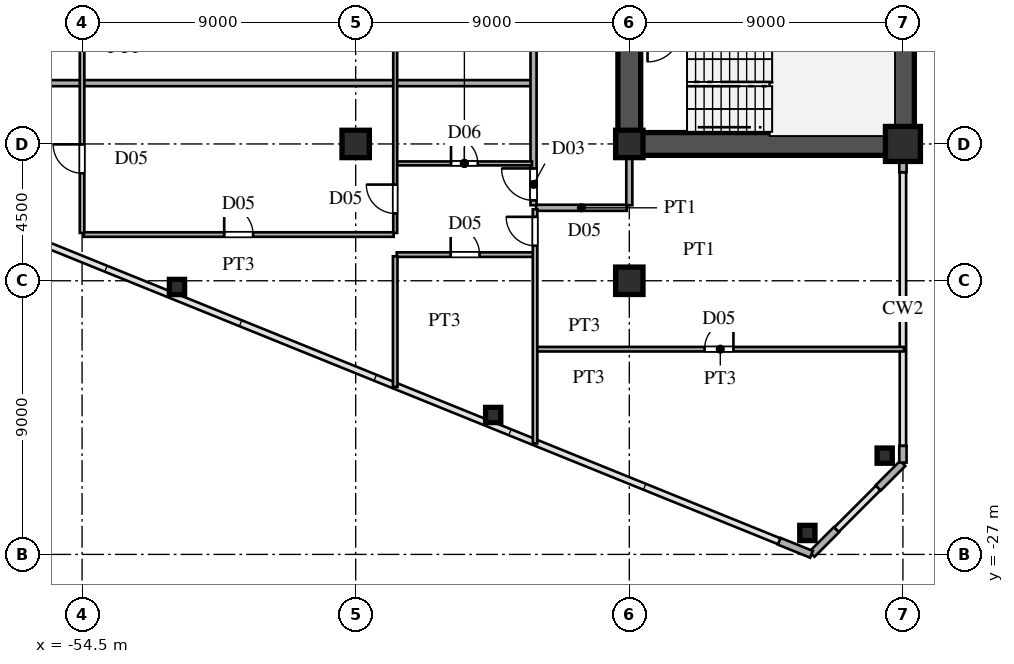
"""IFC4 building model, lengths in metres.
Left out: names, types, materials, properties, quantities, classifications, styles, units other than length and angle.
Written with IfcOpenShell. Run it as: python <this file> out.ifc"""

import sys

from ifc_helpers import new_model, si_unit, direction, frame, frame_2d, origin, origin_2d, place, context, subcontext, project, spatial, rectangle, hollow_rectangle, i_section, extrude, source, transform, mapped, element, fill, save


model = new_model("IFC4")
c1 = context("Model", 3, precision=1e-05, world=origin(), true_north=direction((0.0, 1.0)))
c2 = subcontext(c1, "Body", "Model", "MODEL_VIEW")
j1 = project(units=[si_unit("LENGTHUNIT", "METRE"), si_unit("PLANEANGLEUNIT", "RADIAN")], contexts=[c1])
p1 = place(None, origin())
s1 = spatial("IfcSite", under=j1, at=p1, CompositionType="ELEMENT")
p2 = place(p1, origin())
s2 = spatial("IfcBuilding", under=s1, at=p2, CompositionType="ELEMENT")
p3 = place(p2, frame((0.0, 0.0, 26.1)))
s3 = spatial("IfcBuildingStorey", under=s2, at=p3, CompositionType="ELEMENT", Elevation=26.1)
m1 = source(origin(), c2, "Body", "SweptSolid", [
    extrude(hollow_rectangle(XDim=1.15, YDim=1.15, WallThickness=0.048, at=origin_2d()), origin(), (0.0, 0.0, 1.0), 3.6),
])
p4 = place(p3, frame((-27.5, -13.5, 0.0), z_axis=(0.0, 0.0, 1.0), x_axis=(1.0, 0.0, 0.0)))
e1 = element("IfcColumn", 1, at=p4, inside=s3, PredefinedType="COLUMN", context=c2, shape_type="MappedRepresentation", body=[
    mapped(m1, transform((0.0, 0.0, 0.0), scale=1.0)),
])
m2 = source(origin(), c2, "Body", "SweptSolid", [
    extrude(i_section(OverallWidth=0.9, OverallDepth=0.9, WebThickness=0.036, FlangeThickness=0.055, at=origin_2d()), origin(), (0.0, 0.0, 1.0), 3.6),
])
for number, where, z_axis, x_axis in (
    (2, (-36.5, -18.0, 0.0), (0.0, 0.0, 1.0), (1.0, 0.0, 0.0)),
    (3, (-36.5, -13.5, 0.0), (0.0, 0.0, 1.0), (1.0, 0.0, 0.0)),
    (4, (-45.5, -13.5, 0.0), (0.0, 0.0, 1.0), (1.0, 0.0, 0.0)),
):
    element("IfcColumn", number, at=place(p3, frame(where, z_axis=z_axis, x_axis=x_axis)), inside=s3, PredefinedType="COLUMN", context=c2, shape_type="MappedRepresentation", body=[
        mapped(m2, transform((0.0, 0.0, 0.0), scale=1.0)),
    ])
m3 = source(origin(), c2, "Body", "SweptSolid", [
    extrude(hollow_rectangle(XDim=0.5, YDim=0.5, WallThickness=0.02, at=origin_2d()), origin(), (0.0, 0.0, 1.0), 3.6),
])
for number, where, z_axis, x_axis in (
    (5, (-28.1, -23.751, 0.0), (0.0, 0.0, 1.0), (1.0, 0.0, 0.0)),
    (6, (-30.643, -26.295, 0.0), (0.0, 0.0, 1.0), (1.0, 0.0, 0.0)),
    (7, (-40.977, -22.414, 0.0), (0.0, 0.0, 1.0), (1.0, 0.0, 0.0)),
    (8, (-51.378, -18.204, 0.0), (0.0, 0.0, 1.0), (1.0, 0.0, 0.0)),
):
    element("IfcColumn", number, at=place(p3, frame(where, z_axis=z_axis, x_axis=x_axis)), inside=s3, PredefinedType="COLUMN", context=c2, shape_type="MappedRepresentation", body=[
        mapped(m3, transform((0.0, 0.0, 0.0), scale=1.0)),
    ])
p5 = place(p3, frame((-27.5, -23.98, 0.0), z_axis=(0.0, 0.0, 1.0), x_axis=(0.0, 1.0, 0.0)))
e9 = element("IfcWall", 9, at=p5, inside=s3, PredefinedType="SOLIDWALL", context=c2, shape_type="SweptSolid", body=[
    extrude(rectangle(XDim=0.55, YDim=0.24, at=frame_2d((0.275, 0.0))), origin(), (0.0, 0.0, 1.0), 3.38),
])
p6 = place(p3, frame((-27.5, -14.43, 0.0), z_axis=(0.0, 0.0, 1.0), x_axis=(0.0, 1.0, 0.0)))
e10 = element("IfcWall", 10, at=p6, inside=s3, PredefinedType="SOLIDWALL", context=c2, shape_type="SweptSolid", body=[
    extrude(rectangle(XDim=0.55, YDim=0.24, at=frame_2d((0.275, 0.0))), origin(), (0.0, 0.0, 1.0), 2.88),
])
p7 = place(p3, frame((-31.566, -26.569, 0.0), z_axis=(0.0, 0.0, 1.0), x_axis=(0.927007103665, -0.375043770452, 0.0)))
e11 = element("IfcWall", 11, at=p7, inside=s3, PredefinedType="SOLIDWALL", context=c2, shape_type="SweptSolid", body=[
    extrude(rectangle(XDim=1.14, YDim=0.24, at=frame_2d((0.57, 0.0))), origin(), (0.0, 0.0, 1.0), 3.38),
])
for number, where, z_axis, x_axis in (
    (12, (-30.493, -26.993, 0.0), (0.0, 0.0, 1.0), (0.707, 0.707, 0.0)),
    (13, (-28.313, -24.813, 0.0), (0.0, 0.0, 1.0), (0.707, 0.707, 0.0)),
):
    element("IfcWall", number, at=place(p3, frame(where, z_axis=z_axis, x_axis=x_axis)), inside=s3, PredefinedType="SOLIDWALL", context=c2, shape_type="SweptSolid", body=[
        extrude(rectangle(XDim=1.14, YDim=0.24, at=frame_2d((0.57, 0.0))), origin(), (0.0, 0.0, 1.0), 3.38),
    ])
p8 = place(p3, frame((-27.5, -13.5, 0.0), z_axis=(0.0, 0.0, 1.0), x_axis=(0.0, 1.0, 0.0)))
e14 = element("IfcWall", 14, at=p8, inside=s3, PredefinedType="SHEAR", context=c2, shape_type="SweptSolid", body=[
    extrude(rectangle(XDim=12.2, YDim=0.75, at=frame_2d((6.1, 0.0))), origin(), (0.0, 0.0, 1.0), 3.38),
])
p9 = place(p3, frame((-36.5, -13.5, 0.0), z_axis=(0.0, 0.0, 1.0), x_axis=(1.0, 0.0, 0.0)))
e15 = element("IfcWall", 15, at=p9, inside=s3, PredefinedType="SHEAR", context=c2, shape_type="SweptSolid", body=[
    extrude(rectangle(XDim=9.0, YDim=0.75, at=frame_2d((4.5, 0.0))), origin(), (0.0, 0.0, 1.0), 3.38),
])
p10 = place(p3, frame((-36.5, -13.65, 0.0), z_axis=(0.0, 0.0, 1.0), x_axis=(0.0, 1.0, 0.0)))
e16 = element("IfcWall", 16, at=p10, inside=s3, PredefinedType="SHEAR", context=c2, shape_type="SweptSolid", body=[
    extrude(rectangle(XDim=7.15, YDim=0.75, at=frame_2d((3.575, 0.0))), origin(), (0.0, 0.0, 1.0), 3.38),
])
p11 = place(p10, frame((4.675, 0.0, 0.0)))
e17 = element("IfcOpeningElement", 17, at=p11, cuts=e16, PredefinedType="OPENING", context=c2, shape_type="SweptSolid", body=[
    extrude(rectangle(XDim=1.15, YDim=2.2, at=frame_2d((0.575, 1.1))), frame((0.0, 0.385, 0.0), z_axis=(0.0, -1.0, 0.0), x_axis=(1.0, 0.0, 0.0)), (0.0, 0.0, 1.0), 0.77),
])
p12 = place(p3, frame((-39.55, -20.25, 0.0), z_axis=(0.0, 0.0, 1.0), x_axis=(1.0, 0.0, 0.0)))
e18 = element("IfcWall", 18, at=p12, inside=s3, PredefinedType="PARTITIONING", context=c2, shape_type="SweptSolid", body=[
    extrude(rectangle(XDim=12.085, YDim=0.15, at=frame_2d((6.042, 0.0))), origin(), (0.0, 0.0, 1.0), 3.38),
])
p13 = place(p12, frame((5.525, 0.0, 0.0)))
e19 = element("IfcOpeningElement", 19, at=p13, cuts=e18, PredefinedType="OPENING", context=c2, shape_type="SweptSolid", body=[
    extrude(rectangle(XDim=0.95, YDim=2.15, at=frame_2d((0.475, 1.075))), frame((0.0, 0.085, 0.0), z_axis=(0.0, -1.0, 0.0), x_axis=(1.0, 0.0, 0.0)), (0.0, 0.0, 1.0), 0.17),
])
p14 = place(p3, frame((-44.15, -17.14, 0.0), z_axis=(0.0, 0.0, 1.0), x_axis=(1.0, 0.0, 0.0)))
e20 = element("IfcWall", 20, at=p14, inside=s3, PredefinedType="PARTITIONING", context=c2, shape_type="SweptSolid", body=[
    extrude(rectangle(XDim=4.5, YDim=0.15, at=frame_2d((2.25, 0.0))), origin(), (0.0, 0.0, 1.0), 3.38),
])
p15 = place(p14, frame((1.775, 0.0, 0.0)))
e21 = element("IfcOpeningElement", 21, at=p15, cuts=e20, PredefinedType="OPENING", context=c2, shape_type="SweptSolid", body=[
    extrude(rectangle(XDim=0.95, YDim=2.15, at=frame_2d((0.475, 1.075))), frame((0.0, 0.085, 0.0), z_axis=(0.0, -1.0, 0.0), x_axis=(1.0, 0.0, 0.0)), (0.0, 0.0, 1.0), 0.17),
])
p16 = place(p3, frame((-54.45, -16.48, 0.0), z_axis=(0.0, 0.0, 1.0), x_axis=(1.0, 0.0, 0.0)))
e22 = element("IfcWall", 22, at=p16, inside=s3, PredefinedType="PARTITIONING", context=c2, shape_type="SweptSolid", body=[
    extrude(rectangle(XDim=10.2, YDim=0.15, at=frame_2d((5.1, 0.0))), origin(), (0.0, 0.0, 1.0), 3.38),
])
p17 = place(p16, frame((4.625, 0.0, 0.0)))
e23 = element("IfcOpeningElement", 23, at=p17, cuts=e22, PredefinedType="OPENING", context=c2, shape_type="SweptSolid", body=[
    extrude(rectangle(XDim=0.95, YDim=2.15, at=frame_2d((0.475, 1.075))), frame((0.0, 0.085, 0.0), z_axis=(0.0, -1.0, 0.0), x_axis=(1.0, 0.0, 0.0)), (0.0, 0.0, 1.0), 0.17),
])
p18 = place(p3, frame((-39.565, -15.6, 0.0), z_axis=(0.0, 0.0, 1.0), x_axis=(1.0, 0.0, 0.0)))
e24 = element("IfcWall", 24, at=p18, inside=s3, PredefinedType="PARTITIONING", context=c2, shape_type="SweptSolid", body=[
    extrude(rectangle(XDim=2.98, YDim=0.2, at=frame_2d((1.49, 0.0))), origin(), (0.0, 0.0, 1.0), 3.38),
])
p19 = place(p3, frame((-44.15, -14.14, 0.0), z_axis=(0.0, 0.0, 1.0), x_axis=(1.0, 0.0, 0.0)))
e25 = element("IfcWall", 25, at=p19, inside=s3, PredefinedType="PARTITIONING", context=c2, shape_type="SweptSolid", body=[
    extrude(rectangle(XDim=4.45, YDim=0.13, at=frame_2d((2.225, 0.0))), origin(), (0.0, 0.0, 1.0), 3.38),
])
p20 = place(p19, frame((1.785, 0.0, 0.0)))
e26 = element("IfcOpeningElement", 26, at=p20, cuts=e25, PredefinedType="OPENING", context=c2, shape_type="SweptSolid", body=[
    extrude(rectangle(XDim=0.88, YDim=2.1, at=frame_2d((0.44, 1.05))), frame((0.0, 0.075, 0.0), z_axis=(0.0, -1.0, 0.0), x_axis=(1.0, 0.0, 0.0)), (0.0, 0.0, 1.0), 0.15),
])
p21 = place(p3, frame((-68.807, -11.5, 0.0), z_axis=(0.0, 0.0, 1.0), x_axis=(1.0, 0.0, 0.0)))
e27 = element("IfcWall", 27, at=p21, inside=s3, PredefinedType="PARTITIONING", context=c2, shape_type="SweptSolid", body=[
    extrude(rectangle(XDim=29.077, YDim=0.2, at=frame_2d((14.539, 0.0))), origin(), (0.0, 0.0, 1.0), 3.38),
])
p22 = place(p3, frame((-54.5, -16.427, 0.0), z_axis=(0.0, 0.0, 1.0), x_axis=(0.0, 1.0, 0.0)))
e28 = element("IfcWall", 28, at=p22, inside=s3, PredefinedType="PARTITIONING", context=c2, shape_type="SweptSolid", body=[
    extrude(rectangle(XDim=32.854, YDim=0.15, at=frame_2d((16.427, 0.0))), origin(), (0.0, 0.0, 1.0), 2.68),
])
p23 = place(p22, frame((1.963, 0.0, 0.0)))
e29 = element("IfcOpeningElement", 29, at=p23, cuts=e28, PredefinedType="OPENING", context=c2, shape_type="SweptSolid", body=[
    extrude(rectangle(XDim=0.95, YDim=2.15, at=frame_2d((0.475, 1.075))), frame((0.0, 0.085, 0.0), z_axis=(0.0, -1.0, 0.0), x_axis=(1.0, 0.0, 0.0)), (0.0, 0.0, 1.0), 0.17),
])
p24 = place(p22, frame((10.47, 0.0, 0.0)))
e30 = element("IfcOpeningElement", 30, at=p24, cuts=e28, PredefinedType="OPENING", context=c2, shape_type="SweptSolid", body=[
    extrude(rectangle(XDim=0.95, YDim=2.15, at=frame_2d((0.475, 1.075))), frame((0.0, 0.085, 0.0), z_axis=(0.0, -1.0, 0.0), x_axis=(1.0, 0.0, 0.0)), (0.0, 0.0, 1.0), 0.17),
])
p25 = place(p22, frame((19.504, 0.0, 0.0)))
e31 = element("IfcOpeningElement", 31, at=p25, cuts=e28, PredefinedType="OPENING", context=c2, shape_type="SweptSolid", body=[
    extrude(rectangle(XDim=0.95, YDim=2.15, at=frame_2d((0.475, 1.075))), frame((0.0, 0.085, 0.0), z_axis=(0.0, -1.0, 0.0), x_axis=(1.0, 0.0, 0.0)), (0.0, 0.0, 1.0), 0.17),
])
p26 = place(p22, frame((29.941, 0.0, 0.0)))
e32 = element("IfcOpeningElement", 32, at=p26, cuts=e28, PredefinedType="OPENING", context=c2, shape_type="SweptSolid", body=[
    extrude(rectangle(XDim=0.95, YDim=2.15, at=frame_2d((0.475, 1.075))), frame((0.0, 0.085, 0.0), z_axis=(0.0, -1.0, 0.0), x_axis=(1.0, 0.0, 0.0)), (0.0, 0.0, 1.0), 0.17),
])
p27 = place(p3, frame((-44.2, -21.49, 0.0), z_axis=(0.0, 0.0, 1.0), x_axis=(0.0, 1.0, 0.0)))
e33 = element("IfcWall", 33, at=p27, inside=s3, PredefinedType="PARTITIONING", context=c2, shape_type="SweptSolid", body=[
    extrude(rectangle(XDim=4.295, YDim=0.15, at=frame_2d((2.147, 0.0))), origin(), (0.0, 0.0, 1.0), 3.38),
])
p28 = place(p3, frame((-44.2, -16.427, 0.0), z_axis=(0.0, 0.0, 1.0), x_axis=(0.0, 1.0, 0.0)))
e34 = element("IfcWall", 34, at=p28, inside=s3, PredefinedType="PARTITIONING", context=c2, shape_type="SweptSolid", body=[
    extrude(rectangle(XDim=13.877, YDim=0.13, at=frame_2d((6.938, 0.0))), origin(), (0.0, 0.0, 1.0), 3.38),
])
p29 = place(p28, frame((0.641, 0.0, 0.0)))
e35 = element("IfcOpeningElement", 35, at=p29, cuts=e34, PredefinedType="OPENING", context=c2, shape_type="SweptSolid", body=[
    extrude(rectangle(XDim=0.95, YDim=2.15, at=frame_2d((0.475, 1.075))), frame((0.0, 0.075, 0.0), z_axis=(0.0, -1.0, 0.0), x_axis=(1.0, 0.0, 0.0)), (0.0, 0.0, 1.0), 0.15),
])
p30 = place(p28, frame((10.454, 0.0, 0.0)))
e36 = element("IfcOpeningElement", 36, at=p30, cuts=e34, PredefinedType="OPENING", context=c2, shape_type="SweptSolid", body=[
    extrude(rectangle(XDim=0.95, YDim=2.15, at=frame_2d((0.475, 1.075))), frame((0.0, 0.075, 0.0), z_axis=(0.0, -1.0, 0.0), x_axis=(1.0, 0.0, 0.0)), (0.0, 0.0, 1.0), 0.15),
])
p31 = place(p3, frame((-39.65, -15.515, 0.0), z_axis=(0.0, 0.0, 1.0), x_axis=(0.0, 1.0, 0.0)))
e37 = element("IfcWall", 37, at=p31, inside=s3, PredefinedType="PARTITIONING", context=c2, shape_type="SweptSolid", body=[
    extrude(rectangle(XDim=31.03, YDim=0.2, at=frame_2d((15.515, 0.0))), origin(), (0.0, 0.0, 1.0), 3.38),
])
p32 = place(p31, frame((0.16, 0.0, 0.0)))
e38 = element("IfcOpeningElement", 38, at=p32, cuts=e37, PredefinedType="OPENING", context=c2, shape_type="SweptSolid", body=[
    extrude(rectangle(XDim=1.05, YDim=2.25, at=frame_2d((0.525, 1.125))), frame((0.0, 0.11, 0.0), z_axis=(0.0, -1.0, 0.0), x_axis=(1.0, 0.0, 0.0)), (0.0, 0.0, 1.0), 0.22),
])
p33 = place(p31, frame((10.038, 0.0, 0.0)))
e39 = element("IfcOpeningElement", 39, at=p33, cuts=e37, PredefinedType="OPENING", context=c2, shape_type="SweptSolid", body=[
    extrude(rectangle(XDim=1.05, YDim=2.25, at=frame_2d((0.525, 1.125))), frame((0.0, 0.11, 0.0), z_axis=(0.0, -1.0, 0.0), x_axis=(1.0, 0.0, 0.0)), (0.0, 0.0, 1.0), 0.22),
])
p34 = place(p31, frame((21.638, 0.0, 0.0)))
e40 = element("IfcOpeningElement", 40, at=p34, cuts=e37, PredefinedType="OPENING", context=c2, shape_type="SweptSolid", body=[
    extrude(rectangle(XDim=1.05, YDim=2.25, at=frame_2d((0.525, 1.125))), frame((0.0, 0.11, 0.0), z_axis=(0.0, -1.0, 0.0), x_axis=(1.0, 0.0, 0.0)), (0.0, 0.0, 1.0), 0.22),
])
p35 = place(p31, frame((29.82, 0.0, 0.0)))
e41 = element("IfcOpeningElement", 41, at=p35, cuts=e37, PredefinedType="OPENING", context=c2, shape_type="SweptSolid", body=[
    extrude(rectangle(XDim=1.05, YDim=2.25, at=frame_2d((0.525, 1.125))), frame((0.0, 0.11, 0.0), z_axis=(0.0, -1.0, 0.0), x_axis=(1.0, 0.0, 0.0)), (0.0, 0.0, 1.0), 0.22),
])
p36 = place(p3, frame((-39.6, -23.352, 0.0), z_axis=(0.0, 0.0, 1.0), x_axis=(0.0, 1.0, 0.0)))
e42 = element("IfcWall", 42, at=p36, inside=s3, PredefinedType="PARTITIONING", context=c2, shape_type="SweptSolid", body=[
    extrude(rectangle(XDim=7.702, YDim=0.15, at=frame_2d((3.851, 0.0))), origin(), (0.0, 0.0, 1.0), 3.38),
])
p37 = place(p36, frame((6.504, 0.0, 0.0)))
e43 = element("IfcOpeningElement", 43, at=p37, cuts=e42, PredefinedType="OPENING", context=c2, shape_type="SweptSolid", body=[
    extrude(rectangle(XDim=0.95, YDim=2.15, at=frame_2d((0.475, 1.075))), frame((0.0, 0.085, 0.0), z_axis=(0.0, -1.0, 0.0), x_axis=(1.0, 0.0, 0.0)), (0.0, 0.0, 1.0), 0.17),
])
p38 = place(p3, frame((-36.5, -15.515, 0.0), z_axis=(0.0, 0.0, 1.0), x_axis=(0.0, 1.0, 0.0)))
e44 = element("IfcWall", 44, at=p38, inside=s3, PredefinedType="PARTITIONING", context=c2, shape_type="SweptSolid", body=[
    extrude(rectangle(XDim=1.635, YDim=0.2, at=frame_2d((0.817, 0.0))), origin(), (0.0, 0.0, 1.0), 2.68),
])
m4 = source(origin(), c2, "Body", "SweptSolid", [
    extrude(rectangle(XDim=0.95, YDim=2.15, at=frame_2d((0.475, 1.075))), frame((0.0, 0.025, 0.0), z_axis=(0.0, -1.0, 0.0), x_axis=(1.0, 0.0, 0.0)), (0.0, 0.0, 1.0), 0.05),
])
p39 = place(p13, origin())
e45 = element("IfcDoor", 45, at=p39, inside=s3, OperationType="SINGLE_SWING_RIGHT", PredefinedType="DOOR", context=c2, shape_type="MappedRepresentation", body=[
    mapped(m4, transform((0.0, 0.0, 0.0), scale=1.0)),
])
fill(e19, e45)
p40 = place(p15, origin())
e46 = element("IfcDoor", 46, at=p40, inside=s3, OperationType="SINGLE_SWING_LEFT", PredefinedType="DOOR", context=c2, shape_type="MappedRepresentation", body=[
    mapped(m4, transform((0.0, 0.0, 0.0), scale=1.0)),
])
fill(e21, e46)
p41 = place(p17, origin())
e47 = element("IfcDoor", 47, at=p41, inside=s3, OperationType="SINGLE_SWING_LEFT", PredefinedType="DOOR", context=c2, shape_type="MappedRepresentation", body=[
    mapped(m4, transform((0.0, 0.0, 0.0), scale=1.0)),
])
fill(e23, e47)
m5 = source(origin(), c2, "Body", "SweptSolid", [
    extrude(rectangle(XDim=0.88, YDim=2.1, at=frame_2d((0.44, 1.05))), frame((0.0, 0.025, 0.0), z_axis=(0.0, -1.0, 0.0), x_axis=(1.0, 0.0, 0.0)), (0.0, 0.0, 1.0), 0.05),
])
p42 = place(p20, origin())
e48 = element("IfcDoor", 48, at=p42, inside=s3, OperationType="SINGLE_SWING_LEFT", PredefinedType="DOOR", context=c2, shape_type="MappedRepresentation", body=[
    mapped(m5, transform((0.0, 0.0, 0.0), scale=1.0)),
])
fill(e26, e48)
p43 = place(p23, origin())
e49 = element("IfcDoor", 49, at=p43, inside=s3, OperationType="SINGLE_SWING_RIGHT", PredefinedType="DOOR", context=c2, shape_type="MappedRepresentation", body=[
    mapped(m4, transform((0.0, 0.0, 0.0), scale=1.0)),
])
fill(e29, e49)
p44 = place(p29, origin())
e50 = element("IfcDoor", 50, at=p44, inside=s3, OperationType="SINGLE_SWING_RIGHT", PredefinedType="DOOR", context=c2, shape_type="MappedRepresentation", body=[
    mapped(m4, transform((0.0, 0.0, 0.0), scale=1.0)),
])
fill(e35, e50)
m6 = source(origin(), c2, "Body", "SweptSolid", [
    extrude(rectangle(XDim=1.05, YDim=2.25, at=frame_2d((0.525, 1.125))), frame((0.0, 0.025, 0.0), z_axis=(0.0, -1.0, 0.0), x_axis=(1.0, 0.0, 0.0)), (0.0, 0.0, 1.0), 0.05),
])
p45 = place(p32, origin())
e51 = element("IfcDoor", 51, at=p45, inside=s3, OperationType="SINGLE_SWING_RIGHT", PredefinedType="DOOR", context=c2, shape_type="MappedRepresentation", body=[
    mapped(m6, transform((0.0, 0.0, 0.0), scale=1.0)),
])
fill(e38, e51)
p46 = place(p37, origin())
e52 = element("IfcDoor", 52, at=p46, inside=s3, OperationType="SINGLE_SWING_RIGHT", PredefinedType="DOOR", context=c2, shape_type="MappedRepresentation", body=[
    mapped(m4, transform((0.0, 0.0, 0.0), scale=1.0)),
])
fill(e43, e52)
save(model, sys.argv[1])
